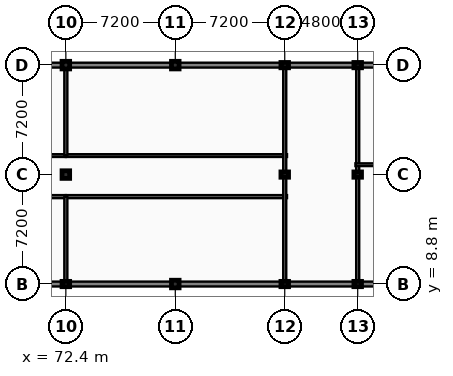
"""IFC4 building model, lengths in metres.
Left out: names, types, materials, properties, quantities, classifications, styles, units other than length and angle.
Written with IfcOpenShell. Run it as: python <this file> out.ifc"""

import sys

from ifc_helpers import new_model, si_unit, direction, frame, frame_2d, origin, origin_2d, place, context, subcontext, project, spatial, rectangle, extrude, element, fill, save


model = new_model("IFC4")
c1 = context("Model", 3, precision=1e-05, world=origin(), true_north=direction((0.0, 1.0)))
c2 = subcontext(c1, "Body", "Model", "MODEL_VIEW")
j1 = project(units=[si_unit("LENGTHUNIT", "METRE"), si_unit("PLANEANGLEUNIT", "RADIAN")], contexts=[c1])
p1 = place(None, origin())
s1 = spatial("IfcSite", under=j1, at=p1, CompositionType="ELEMENT")
p2 = place(p1, origin())
s2 = spatial("IfcBuilding", under=s1, at=p2, CompositionType="ELEMENT")
p3 = place(p2, origin())
s3 = spatial("IfcBuildingStorey", under=s2, at=p3, CompositionType="ELEMENT", Elevation=0.0)
p4 = place(p3, frame((72.4, 8.8, 0.0), z_axis=(0.0, 0.0, 1.0), x_axis=(1.0, 0.0, 0.0)))
e1 = element("IfcColumn", 1, at=p4, inside=s3, PredefinedType="PILASTER", context=c2, shape_type="SweptSolid", body=[
    extrude(rectangle(XDim=0.5, YDim=0.35, at=origin_2d()), origin(), (0.0, 0.0, 1.0), 5.4),
])
for number, where, z_axis, x_axis in (
    (2, (72.4, 16.0, 0.0), (0.0, 0.0, 1.0), (1.0, 0.0, 0.0)),
    (3, (72.4, 23.2, 0.0), (0.0, 0.0, 1.0), (1.0, 0.0, 0.0)),
    (4, (79.6, 8.8, 0.0), (0.0, 0.0, 1.0), (1.0, 0.0, 0.0)),
    (5, (79.6, 23.2, 0.0), (0.0, 0.0, 1.0), (1.0, 0.0, 0.0)),
):
    element("IfcColumn", number, at=place(p3, frame(where, z_axis=z_axis, x_axis=x_axis)), inside=s3, PredefinedType="COLUMN", context=c2, shape_type="SweptSolid", body=[
        extrude(rectangle(XDim=0.5, YDim=0.5, at=origin_2d()), origin(), (0.0, 0.0, 1.0), 5.4),
    ])
for number, where, z_axis, x_axis in (
    (6, (86.8, 8.8, 0.0), (0.0, 0.0, 1.0), (1.0, 0.0, 0.0)),
    (7, (86.8, 16.0, 0.0), (0.0, 0.0, 1.0), (1.0, 0.0, 0.0)),
    (8, (86.8, 23.2, 0.0), (0.0, 0.0, 1.0), (1.0, 0.0, 0.0)),
    (9, (91.6, 8.8, 0.0), (0.0, 0.0, 1.0), (1.0, 0.0, 0.0)),
    (10, (91.6, 16.0, 0.0), (0.0, 0.0, 1.0), (1.0, 0.0, 0.0)),
    (11, (91.6, 23.2, 0.0), (0.0, 0.0, 1.0), (1.0, 0.0, 0.0)),
):
    element("IfcColumn", number, at=place(p3, frame(where, z_axis=z_axis, x_axis=x_axis)), inside=s3, PredefinedType="PILASTER", context=c2, shape_type="SweptSolid", body=[
        extrude(rectangle(XDim=0.5, YDim=0.35, at=origin_2d()), origin(), (0.0, 0.0, 1.0), 5.4),
    ])
p5 = place(p3, frame((59.65, 14.55, 0.0), z_axis=(0.0, 0.0, 1.0), x_axis=(1.0, 0.0, 0.0)))
e12 = element("IfcWall", 12, at=p5, inside=s3, PredefinedType="PARTITIONING", context=c2, shape_type="SweptSolid", body=[
    extrude(rectangle(XDim=12.75, YDim=0.2, at=frame_2d((6.375, 0.0))), origin(), (0.0, 0.0, 1.0), 4.39),
])
p6 = place(p5, frame((2.079, 0.0, -0.01)))
e13 = element("IfcOpeningElement", 13, at=p6, cuts=e12, PredefinedType="OPENING", context=c2, shape_type="SweptSolid", body=[
    extrude(rectangle(XDim=1.2, YDim=2.21, at=frame_2d((0.6, 1.105))), frame((0.0, 0.11, 0.0), z_axis=(0.0, -1.0, 0.0), x_axis=(1.0, 0.0, 0.0)), (0.0, 0.0, 1.0), 0.22),
])
p7 = place(p3, frame((72.4, 14.55, 0.0), z_axis=(0.0, 0.0, 1.0), x_axis=(1.0, 0.0, 0.0)))
e14 = element("IfcWall", 14, at=p7, inside=s3, PredefinedType="PARTITIONING", context=c2, shape_type="SweptSolid", body=[
    extrude(rectangle(XDim=14.55, YDim=0.2, at=frame_2d((7.275, 0.0))), origin(), (0.0, 0.0, 1.0), 4.39),
])
p8 = place(p7, frame((5.34, 0.0, -0.01)))
e15 = element("IfcOpeningElement", 15, at=p8, cuts=e14, PredefinedType="OPENING", context=c2, shape_type="SweptSolid", body=[
    extrude(rectangle(XDim=1.2, YDim=2.21, at=frame_2d((0.6, 1.105))), frame((0.0, 0.11, 0.0), z_axis=(0.0, -1.0, 0.0), x_axis=(1.0, 0.0, 0.0)), (0.0, 0.0, 1.0), 0.22),
])
p9 = place(p3, frame((68.5, 17.25, 0.0), z_axis=(0.0, 0.0, 1.0), x_axis=(1.0, 0.0, 0.0)))
e16 = element("IfcWall", 16, at=p9, inside=s3, PredefinedType="PARTITIONING", context=c2, shape_type="SweptSolid", body=[
    extrude(rectangle(XDim=3.9, YDim=0.18, at=frame_2d((1.95, 0.0))), origin(), (0.0, 0.0, 1.0), 4.39),
])
p10 = place(p9, frame((1.45, 0.0, -0.01)))
e17 = element("IfcOpeningElement", 17, at=p10, cuts=e16, PredefinedType="OPENING", context=c2, shape_type="SweptSolid", body=[
    extrude(rectangle(XDim=1.0, YDim=2.16, at=frame_2d((0.5, 1.08))), frame((0.0, 0.1, 0.0), z_axis=(0.0, -1.0, 0.0), x_axis=(1.0, 0.0, 0.0)), (0.0, 0.0, 1.0), 0.2),
])
p11 = place(p3, frame((72.4, 17.25, 0.0), z_axis=(0.0, 0.0, 1.0), x_axis=(1.0, 0.0, 0.0)))
e18 = element("IfcWall", 18, at=p11, inside=s3, PredefinedType="PARTITIONING", context=c2, shape_type="SweptSolid", body=[
    extrude(rectangle(XDim=14.55, YDim=0.18, at=frame_2d((7.275, 0.0))), origin(), (0.0, 0.0, 1.0), 4.39),
])
p12 = place(p11, frame((5.34, 0.0, -0.01)))
e19 = element("IfcOpeningElement", 19, at=p12, cuts=e18, PredefinedType="OPENING", context=c2, shape_type="SweptSolid", body=[
    extrude(rectangle(XDim=1.2, YDim=2.21, at=frame_2d((0.6, 1.105))), frame((0.0, 0.1, 0.0), z_axis=(0.0, -1.0, 0.0), x_axis=(1.0, 0.0, 0.0)), (0.0, 0.0, 1.0), 0.2),
])
p13 = place(p3, frame((72.4, 8.95, 0.0), z_axis=(0.0, 0.0, 1.0), x_axis=(0.0, 1.0, 0.0)))
e20 = element("IfcWall", 20, at=p13, inside=s3, PredefinedType="PARTITIONING", context=c2, shape_type="SweptSolid", body=[
    extrude(rectangle(XDim=5.6, YDim=0.2, at=frame_2d((2.8, 0.0))), origin(), (0.0, 0.0, 1.0), 4.39),
])
p14 = place(p3, frame((72.4, 17.25, 0.0), z_axis=(0.0, 0.0, 1.0), x_axis=(0.0, 1.0, 0.0)))
e21 = element("IfcWall", 21, at=p14, inside=s3, PredefinedType="PARTITIONING", context=c2, shape_type="SweptSolid", body=[
    extrude(rectangle(XDim=5.8, YDim=0.2, at=frame_2d((2.9, 0.0))), origin(), (0.0, 0.0, 1.0), 4.39),
])
p15 = place(p3, frame((86.8, 8.95, 0.0), z_axis=(0.0, 0.0, 1.0), x_axis=(0.0, 1.0, 0.0)))
e22 = element("IfcWall", 22, at=p15, inside=s3, PredefinedType="PARTITIONING", context=c2, shape_type="SweptSolid", body=[
    extrude(rectangle(XDim=14.1, YDim=0.2, at=frame_2d((7.05, 0.0))), origin(), (0.0, 0.0, 1.0), 3.99),
])
p16 = place(p15, frame((2.706, 0.0, -0.01)))
e23 = element("IfcOpeningElement", 23, at=p16, cuts=e22, PredefinedType="OPENING", context=c2, shape_type="SweptSolid", body=[
    extrude(rectangle(XDim=1.8, YDim=2.26, at=frame_2d((0.9, 1.13))), frame((0.0, 0.11, 0.0), z_axis=(0.0, -1.0, 0.0), x_axis=(1.0, 0.0, 0.0)), (0.0, 0.0, 1.0), 0.22),
])
p17 = place(p3, frame((91.6, 8.95, 0.0), z_axis=(0.0, 0.0, 1.0), x_axis=(0.0, 1.0, 0.0)))
e24 = element("IfcWall", 24, at=p17, inside=s3, PredefinedType="PARTITIONING", context=c2, shape_type="SweptSolid", body=[
    extrude(rectangle(XDim=14.1, YDim=0.2, at=frame_2d((7.05, 0.0))), origin(), (0.0, 0.0, 1.0), 3.99),
])
p18 = place(p17, frame((3.936, 0.0, -0.01)))
e25 = element("IfcOpeningElement", 25, at=p18, cuts=e24, PredefinedType="OPENING", context=c2, shape_type="SweptSolid", body=[
    extrude(rectangle(XDim=1.8, YDim=2.26, at=frame_2d((0.9, 1.13))), frame((0.0, 0.11, 0.0), z_axis=(0.0, -1.0, 0.0), x_axis=(1.0, 0.0, 0.0)), (0.0, 0.0, 1.0), 0.22),
])
p19 = place(p3, frame((91.45, 16.65, 0.0), z_axis=(0.0, 0.0, 1.0), x_axis=(1.0, 0.0, 0.0)))
e26 = element("IfcWall", 26, at=p19, inside=s3, PredefinedType="PARTITIONING", context=c2, shape_type="SweptSolid", body=[
    extrude(rectangle(XDim=14.2, YDim=0.18, at=frame_2d((7.1, 0.0))), origin(), (0.0, 0.0, 1.0), 4.64),
])
p20 = place(p19, frame((5.67, 0.0, -0.01)))
e27 = element("IfcOpeningElement", 27, at=p20, cuts=e26, PredefinedType="OPENING", context=c2, shape_type="SweptSolid", body=[
    extrude(rectangle(XDim=1.6, YDim=2.21, at=frame_2d((0.8, 1.105))), frame((0.0, 0.1, 0.0), z_axis=(0.0, -1.0, 0.0), x_axis=(1.0, 0.0, 0.0)), (0.0, 0.0, 1.0), 0.2),
])
p21 = place(p3, frame((65.2, 8.8, 0.0), z_axis=(0.0, 0.0, 1.0), x_axis=(1.0, 0.0, 0.0)))
e28 = element("IfcWall", 28, at=p21, inside=s3, PredefinedType="SOLIDWALL", context=c2, shape_type="SweptSolid", body=[
    extrude(rectangle(XDim=7.2, YDim=0.32, at=frame_2d((3.6, 0.0))), origin(), (0.0, 0.0, 1.0), 4.39),
])
p22 = place(p21, frame((0.46, 0.0, 0.9)))
e29 = element("IfcOpeningElement", 29, at=p22, cuts=e28, PredefinedType="OPENING", context=c2, shape_type="SweptSolid", body=[
    extrude(rectangle(XDim=1.8, YDim=2.2, at=frame_2d((0.9, 1.1))), frame((0.0, 0.17, 0.0), z_axis=(0.0, -1.0, 0.0), x_axis=(1.0, 0.0, 0.0)), (0.0, 0.0, 1.0), 0.34),
])
p23 = place(p21, frame((4.86, 0.0, 0.9)))
e30 = element("IfcOpeningElement", 30, at=p23, cuts=e28, PredefinedType="OPENING", context=c2, shape_type="SweptSolid", body=[
    extrude(rectangle(XDim=1.8, YDim=2.2, at=frame_2d((0.9, 1.1))), frame((0.0, 0.17, 0.0), z_axis=(0.0, -1.0, 0.0), x_axis=(1.0, 0.0, 0.0)), (0.0, 0.0, 1.0), 0.34),
])
p24 = place(p3, frame((72.4, 8.8, 0.0), z_axis=(0.0, 0.0, 1.0), x_axis=(1.0, 0.0, 0.0)))
e31 = element("IfcWall", 31, at=p24, inside=s3, PredefinedType="SOLIDWALL", context=c2, shape_type="SweptSolid", body=[
    extrude(rectangle(XDim=7.2, YDim=0.32, at=frame_2d((3.6, 0.0))), origin(), (0.0, 0.0, 1.0), 4.39),
])
p25 = place(p24, frame((0.46, 0.0, 0.9)))
e32 = element("IfcOpeningElement", 32, at=p25, cuts=e31, PredefinedType="OPENING", context=c2, shape_type="SweptSolid", body=[
    extrude(rectangle(XDim=1.8, YDim=2.2, at=frame_2d((0.9, 1.1))), frame((0.0, 0.17, 0.0), z_axis=(0.0, -1.0, 0.0), x_axis=(1.0, 0.0, 0.0)), (0.0, 0.0, 1.0), 0.34),
])
p26 = place(p24, frame((4.86, 0.0, 0.9)))
e33 = element("IfcOpeningElement", 33, at=p26, cuts=e31, PredefinedType="OPENING", context=c2, shape_type="SweptSolid", body=[
    extrude(rectangle(XDim=1.8, YDim=2.2, at=frame_2d((0.9, 1.1))), frame((0.0, 0.17, 0.0), z_axis=(0.0, -1.0, 0.0), x_axis=(1.0, 0.0, 0.0)), (0.0, 0.0, 1.0), 0.34),
])
p27 = place(p3, frame((79.6, 8.8, 0.0), z_axis=(0.0, 0.0, 1.0), x_axis=(1.0, 0.0, 0.0)))
e34 = element("IfcWall", 34, at=p27, inside=s3, PredefinedType="SOLIDWALL", context=c2, shape_type="SweptSolid", body=[
    extrude(rectangle(XDim=7.2, YDim=0.32, at=frame_2d((3.6, 0.0))), origin(), (0.0, 0.0, 1.0), 3.99),
])
p28 = place(p27, frame((1.8, 0.0, -0.01)))
e35 = element("IfcOpeningElement", 35, at=p28, cuts=e34, PredefinedType="OPENING", context=c2, shape_type="SweptSolid", body=[
    extrude(rectangle(XDim=3.6, YDim=3.21, at=frame_2d((1.8, 1.605))), frame((0.0, 0.17, 0.0), z_axis=(0.0, -1.0, 0.0), x_axis=(1.0, 0.0, 0.0)), (0.0, 0.0, 1.0), 0.34),
])
p29 = place(p3, frame((72.4, 23.2, 0.0), z_axis=(0.0, 0.0, 1.0), x_axis=(-1.0, 0.0, 0.0)))
e36 = element("IfcWall", 36, at=p29, inside=s3, PredefinedType="SOLIDWALL", context=c2, shape_type="SweptSolid", body=[
    extrude(rectangle(XDim=7.2, YDim=0.32, at=frame_2d((3.6, 0.0))), origin(), (0.0, 0.0, 1.0), 4.39),
])
p30 = place(p29, frame((0.46, 0.0, 0.9)))
e37 = element("IfcOpeningElement", 37, at=p30, cuts=e36, PredefinedType="OPENING", context=c2, shape_type="SweptSolid", body=[
    extrude(rectangle(XDim=1.8, YDim=2.2, at=frame_2d((0.9, 1.1))), frame((0.0, 0.17, 0.0), z_axis=(0.0, -1.0, 0.0), x_axis=(1.0, 0.0, 0.0)), (0.0, 0.0, 1.0), 0.34),
])
p31 = place(p29, frame((4.86, 0.0, 0.9)))
e38 = element("IfcOpeningElement", 38, at=p31, cuts=e36, PredefinedType="OPENING", context=c2, shape_type="SweptSolid", body=[
    extrude(rectangle(XDim=1.8, YDim=2.2, at=frame_2d((0.9, 1.1))), frame((0.0, 0.17, 0.0), z_axis=(0.0, -1.0, 0.0), x_axis=(1.0, 0.0, 0.0)), (0.0, 0.0, 1.0), 0.34),
])
p32 = place(p3, frame((79.6, 23.2, 0.0), z_axis=(0.0, 0.0, 1.0), x_axis=(-1.0, 0.0, 0.0)))
e39 = element("IfcWall", 39, at=p32, inside=s3, PredefinedType="SOLIDWALL", context=c2, shape_type="SweptSolid", body=[
    extrude(rectangle(XDim=7.2, YDim=0.32, at=frame_2d((3.6, 0.0))), origin(), (0.0, 0.0, 1.0), 4.39),
])
p33 = place(p32, frame((2.6, 0.0, -0.01)))
e40 = element("IfcOpeningElement", 40, at=p33, cuts=e39, PredefinedType="OPENING", context=c2, shape_type="SweptSolid", body=[
    extrude(rectangle(XDim=2.0, YDim=2.41, at=frame_2d((1.0, 1.205))), frame((0.0, 0.17, 0.0), z_axis=(0.0, -1.0, 0.0), x_axis=(1.0, 0.0, 0.0)), (0.0, 0.0, 1.0), 0.34),
])
p34 = place(p3, frame((86.8, 23.2, 0.0), z_axis=(0.0, 0.0, 1.0), x_axis=(-1.0, 0.0, 0.0)))
e41 = element("IfcWall", 41, at=p34, inside=s3, PredefinedType="SOLIDWALL", context=c2, shape_type="SweptSolid", body=[
    extrude(rectangle(XDim=7.2, YDim=0.32, at=frame_2d((3.6, 0.0))), origin(), (0.0, 0.0, 1.0), 3.99),
])
p35 = place(p34, frame((0.46, 0.0, 0.9)))
e42 = element("IfcOpeningElement", 42, at=p35, cuts=e41, PredefinedType="OPENING", context=c2, shape_type="SweptSolid", body=[
    extrude(rectangle(XDim=1.8, YDim=2.2, at=frame_2d((0.9, 1.1))), frame((0.0, 0.17, 0.0), z_axis=(0.0, -1.0, 0.0), x_axis=(1.0, 0.0, 0.0)), (0.0, 0.0, 1.0), 0.34),
])
p36 = place(p34, frame((4.86, 0.0, 0.9)))
e43 = element("IfcOpeningElement", 43, at=p36, cuts=e41, PredefinedType="OPENING", context=c2, shape_type="SweptSolid", body=[
    extrude(rectangle(XDim=1.8, YDim=2.2, at=frame_2d((0.9, 1.1))), frame((0.0, 0.17, 0.0), z_axis=(0.0, -1.0, 0.0), x_axis=(1.0, 0.0, 0.0)), (0.0, 0.0, 1.0), 0.34),
])
p37 = place(p3, frame((91.6, 8.8, 0.0), z_axis=(0.0, 0.0, 1.0), x_axis=(1.0, 0.0, 0.0)))
e44 = element("IfcWall", 44, at=p37, inside=s3, PredefinedType="SOLIDWALL", context=c2, shape_type="SweptSolid", body=[
    extrude(rectangle(XDim=8.4, YDim=0.32, at=frame_2d((4.2, 0.0))), origin(), (0.0, 0.0, 1.0), 3.99),
])
p38 = place(p37, frame((4.26, 0.0, 0.9)))
e45 = element("IfcOpeningElement", 45, at=p38, cuts=e44, PredefinedType="OPENING", context=c2, shape_type="SweptSolid", body=[
    extrude(rectangle(XDim=2.4, YDim=2.35, at=frame_2d((1.2, 1.175))), frame((0.0, 0.17, 0.0), z_axis=(0.0, -1.0, 0.0), x_axis=(1.0, 0.0, 0.0)), (0.0, 0.0, 1.0), 0.34),
])
p39 = place(p3, frame((100.0, 23.2, 0.0), z_axis=(0.0, 0.0, 1.0), x_axis=(-1.0, 0.0, 0.0)))
e46 = element("IfcWall", 46, at=p39, inside=s3, PredefinedType="SOLIDWALL", context=c2, shape_type="SweptSolid", body=[
    extrude(rectangle(XDim=8.4, YDim=0.32, at=frame_2d((4.2, 0.0))), origin(), (0.0, 0.0, 1.0), 3.99),
])
p40 = place(p39, frame((0.46, 0.0, 0.9)))
e47 = element("IfcOpeningElement", 47, at=p40, cuts=e46, PredefinedType="OPENING", context=c2, shape_type="SweptSolid", body=[
    extrude(rectangle(XDim=2.4, YDim=2.35, at=frame_2d((1.2, 1.175))), frame((0.0, 0.17, 0.0), z_axis=(0.0, -1.0, 0.0), x_axis=(1.0, 0.0, 0.0)), (0.0, 0.0, 1.0), 0.34),
])
p41 = place(p39, frame((5.46, 0.0, 0.9)))
e48 = element("IfcOpeningElement", 48, at=p41, cuts=e46, PredefinedType="OPENING", context=c2, shape_type="SweptSolid", body=[
    extrude(rectangle(XDim=2.4, YDim=2.35, at=frame_2d((1.2, 1.175))), frame((0.0, 0.17, 0.0), z_axis=(0.0, -1.0, 0.0), x_axis=(1.0, 0.0, 0.0)), (0.0, 0.0, 1.0), 0.34),
])
p42 = place(p3, frame((86.8, 8.8, 0.0), z_axis=(0.0, 0.0, 1.0), x_axis=(1.0, 0.0, 0.0)))
e49 = element("IfcWall", 49, at=p42, inside=s3, PredefinedType="SOLIDWALL", context=c2, shape_type="SweptSolid", body=[
    extrude(rectangle(XDim=4.8, YDim=0.32, at=frame_2d((2.4, 0.0))), origin(), (0.0, 0.0, 1.0), 3.99),
])
p43 = place(p42, frame((1.46, 0.0, 0.9)))
e50 = element("IfcOpeningElement", 50, at=p43, cuts=e49, PredefinedType="OPENING", context=c2, shape_type="SweptSolid", body=[
    extrude(rectangle(XDim=1.8, YDim=2.2, at=frame_2d((0.9, 1.1))), frame((0.0, 0.17, 0.0), z_axis=(0.0, -1.0, 0.0), x_axis=(1.0, 0.0, 0.0)), (0.0, 0.0, 1.0), 0.34),
])
p44 = place(p3, frame((91.6, 23.2, 0.0), z_axis=(0.0, 0.0, 1.0), x_axis=(-1.0, 0.0, 0.0)))
e51 = element("IfcWall", 51, at=p44, inside=s3, PredefinedType="SOLIDWALL", context=c2, shape_type="SweptSolid", body=[
    extrude(rectangle(XDim=4.8, YDim=0.32, at=frame_2d((2.4, 0.0))), origin(), (0.0, 0.0, 1.0), 3.99),
])
p45 = place(p44, frame((1.46, 0.0, 0.9)))
e52 = element("IfcOpeningElement", 52, at=p45, cuts=e51, PredefinedType="OPENING", context=c2, shape_type="SweptSolid", body=[
    extrude(rectangle(XDim=1.8, YDim=2.2, at=frame_2d((0.9, 1.1))), frame((0.0, 0.17, 0.0), z_axis=(0.0, -1.0, 0.0), x_axis=(1.0, 0.0, 0.0)), (0.0, 0.0, 1.0), 0.34),
])
p46 = place(p8, frame((0.0, 0.0, 0.01)))
e53 = element("IfcDoor", 53, at=p46, inside=s3, OperationType="SINGLE_SWING_RIGHT", PredefinedType="DOOR", context=c2, shape_type="SweptSolid", body=[
    extrude(rectangle(XDim=1.2, YDim=2.2, at=frame_2d((0.6, 1.1))), frame((0.0, 0.025, 0.0), z_axis=(0.0, -1.0, 0.0), x_axis=(1.0, 0.0, 0.0)), (0.0, 0.0, 1.0), 0.05),
])
fill(e15, e53)
p47 = place(p12, frame((0.0, 0.0, 0.01)))
e54 = element("IfcDoor", 54, at=p47, inside=s3, OperationType="SINGLE_SWING_LEFT", PredefinedType="DOOR", context=c2, shape_type="SweptSolid", body=[
    extrude(rectangle(XDim=1.2, YDim=2.2, at=frame_2d((0.6, 1.1))), frame((0.0, 0.025, 0.0), z_axis=(0.0, -1.0, 0.0), x_axis=(1.0, 0.0, 0.0)), (0.0, 0.0, 1.0), 0.05),
])
fill(e19, e54)
p48 = place(p16, frame((0.0, 0.0, 0.01)))
e55 = element("IfcDoor", 55, at=p48, inside=s3, OperationType="DOUBLE_SWING_LEFT", PredefinedType="DOOR", context=c2, shape_type="SweptSolid", body=[
    extrude(rectangle(XDim=1.8, YDim=2.25, at=frame_2d((0.9, 1.125))), frame((0.0, 0.025, 0.0), z_axis=(0.0, -1.0, 0.0), x_axis=(1.0, 0.0, 0.0)), (0.0, 0.0, 1.0), 0.05),
])
fill(e23, e55)
p49 = place(p18, frame((1.8, 0.0, 0.01), z_axis=(0.0, 0.0, 1.0), x_axis=(-1.0, 0.0, 0.0)))
e56 = element("IfcDoor", 56, at=p49, inside=s3, OperationType="DOUBLE_SWING_LEFT", PredefinedType="DOOR", context=c2, shape_type="SweptSolid", body=[
    extrude(rectangle(XDim=1.8, YDim=2.25, at=frame_2d((0.9, 1.125))), frame((0.0, 0.025, 0.0), z_axis=(0.0, -1.0, 0.0), x_axis=(1.0, 0.0, 0.0)), (0.0, 0.0, 1.0), 0.05),
])
fill(e25, e56)
p50 = place(p23, origin())
e57 = element("IfcWindow", 57, at=p50, inside=s3, PartitioningType="DOUBLE_PANEL_VERTICAL", PredefinedType="WINDOW", context=c2, shape_type="SweptSolid", body=[
    extrude(rectangle(XDim=1.8, YDim=2.2, at=frame_2d((0.9, 1.1))), frame((0.0, 0.03, 0.0), z_axis=(0.0, -1.0, 0.0), x_axis=(1.0, 0.0, 0.0)), (0.0, 0.0, 1.0), 0.06),
])
fill(e30, e57)
p51 = place(p25, origin())
e58 = element("IfcWindow", 58, at=p51, inside=s3, PartitioningType="DOUBLE_PANEL_VERTICAL", PredefinedType="WINDOW", context=c2, shape_type="SweptSolid", body=[
    extrude(rectangle(XDim=1.8, YDim=2.2, at=frame_2d((0.9, 1.1))), frame((0.0, 0.03, 0.0), z_axis=(0.0, -1.0, 0.0), x_axis=(1.0, 0.0, 0.0)), (0.0, 0.0, 1.0), 0.06),
])
fill(e32, e58)
p52 = place(p26, origin())
e59 = element("IfcWindow", 59, at=p52, inside=s3, PartitioningType="DOUBLE_PANEL_VERTICAL", PredefinedType="WINDOW", context=c2, shape_type="SweptSolid", body=[
    extrude(rectangle(XDim=1.8, YDim=2.2, at=frame_2d((0.9, 1.1))), frame((0.0, 0.03, 0.0), z_axis=(0.0, -1.0, 0.0), x_axis=(1.0, 0.0, 0.0)), (0.0, 0.0, 1.0), 0.06),
])
fill(e33, e59)
p53 = place(p28, frame((0.0, 0.0, 0.01)))
e60 = element("IfcDoor", 60, at=p53, inside=s3, OperationType="ROLLINGUP", PredefinedType="GATE", context=c2, shape_type="SweptSolid", body=[
    extrude(rectangle(XDim=3.6, YDim=3.2, at=frame_2d((1.8, 1.6))), frame((0.0, 0.025, 0.0), z_axis=(0.0, -1.0, 0.0), x_axis=(1.0, 0.0, 0.0)), (0.0, 0.0, 1.0), 0.05),
])
fill(e35, e60)
p54 = place(p30, origin())
e61 = element("IfcWindow", 61, at=p54, inside=s3, PartitioningType="DOUBLE_PANEL_VERTICAL", PredefinedType="WINDOW", context=c2, shape_type="SweptSolid", body=[
    extrude(rectangle(XDim=1.8, YDim=2.2, at=frame_2d((0.9, 1.1))), frame((0.0, 0.03, 0.0), z_axis=(0.0, -1.0, 0.0), x_axis=(1.0, 0.0, 0.0)), (0.0, 0.0, 1.0), 0.06),
])
fill(e37, e61)
p55 = place(p33, frame((0.0, 0.0, 0.01)))
e62 = element("IfcDoor", 62, at=p55, inside=s3, OperationType="DOUBLE_SWING_LEFT", PredefinedType="DOOR", context=c2, shape_type="SweptSolid", body=[
    extrude(rectangle(XDim=2.0, YDim=2.4, at=frame_2d((1.0, 1.2))), frame((0.0, 0.025, 0.0), z_axis=(0.0, -1.0, 0.0), x_axis=(1.0, 0.0, 0.0)), (0.0, 0.0, 1.0), 0.05),
])
fill(e40, e62)
p56 = place(p35, origin())
e63 = element("IfcWindow", 63, at=p56, inside=s3, PartitioningType="DOUBLE_PANEL_VERTICAL", PredefinedType="WINDOW", context=c2, shape_type="SweptSolid", body=[
    extrude(rectangle(XDim=1.8, YDim=2.2, at=frame_2d((0.9, 1.1))), frame((0.0, 0.03, 0.0), z_axis=(0.0, -1.0, 0.0), x_axis=(1.0, 0.0, 0.0)), (0.0, 0.0, 1.0), 0.06),
])
fill(e42, e63)
p57 = place(p36, origin())
e64 = element("IfcWindow", 64, at=p57, inside=s3, PartitioningType="DOUBLE_PANEL_VERTICAL", PredefinedType="WINDOW", context=c2, shape_type="SweptSolid", body=[
    extrude(rectangle(XDim=1.8, YDim=2.2, at=frame_2d((0.9, 1.1))), frame((0.0, 0.03, 0.0), z_axis=(0.0, -1.0, 0.0), x_axis=(1.0, 0.0, 0.0)), (0.0, 0.0, 1.0), 0.06),
])
fill(e43, e64)
p58 = place(p41, origin())
e65 = element("IfcWindow", 65, at=p58, inside=s3, PartitioningType="TRIPLE_PANEL_VERTICAL", PredefinedType="WINDOW", context=c2, shape_type="SweptSolid", body=[
    extrude(rectangle(XDim=2.4, YDim=2.35, at=frame_2d((1.2, 1.175))), frame((0.0, 0.03, 0.0), z_axis=(0.0, -1.0, 0.0), x_axis=(1.0, 0.0, 0.0)), (0.0, 0.0, 1.0), 0.06),
])
fill(e48, e65)
p59 = place(p43, origin())
e66 = element("IfcWindow", 66, at=p59, inside=s3, PartitioningType="DOUBLE_PANEL_VERTICAL", PredefinedType="WINDOW", context=c2, shape_type="SweptSolid", body=[
    extrude(rectangle(XDim=1.8, YDim=2.2, at=frame_2d((0.9, 1.1))), frame((0.0, 0.03, 0.0), z_axis=(0.0, -1.0, 0.0), x_axis=(1.0, 0.0, 0.0)), (0.0, 0.0, 1.0), 0.06),
])
fill(e50, e66)
p60 = place(p45, origin())
e67 = element("IfcWindow", 67, at=p60, inside=s3, PartitioningType="DOUBLE_PANEL_VERTICAL", PredefinedType="WINDOW", context=c2, shape_type="SweptSolid", body=[
    extrude(rectangle(XDim=1.8, YDim=2.2, at=frame_2d((0.9, 1.1))), frame((0.0, 0.03, 0.0), z_axis=(0.0, -1.0, 0.0), x_axis=(1.0, 0.0, 0.0)), (0.0, 0.0, 1.0), 0.06),
])
fill(e52, e67)
save(model, sys.argv[1])
